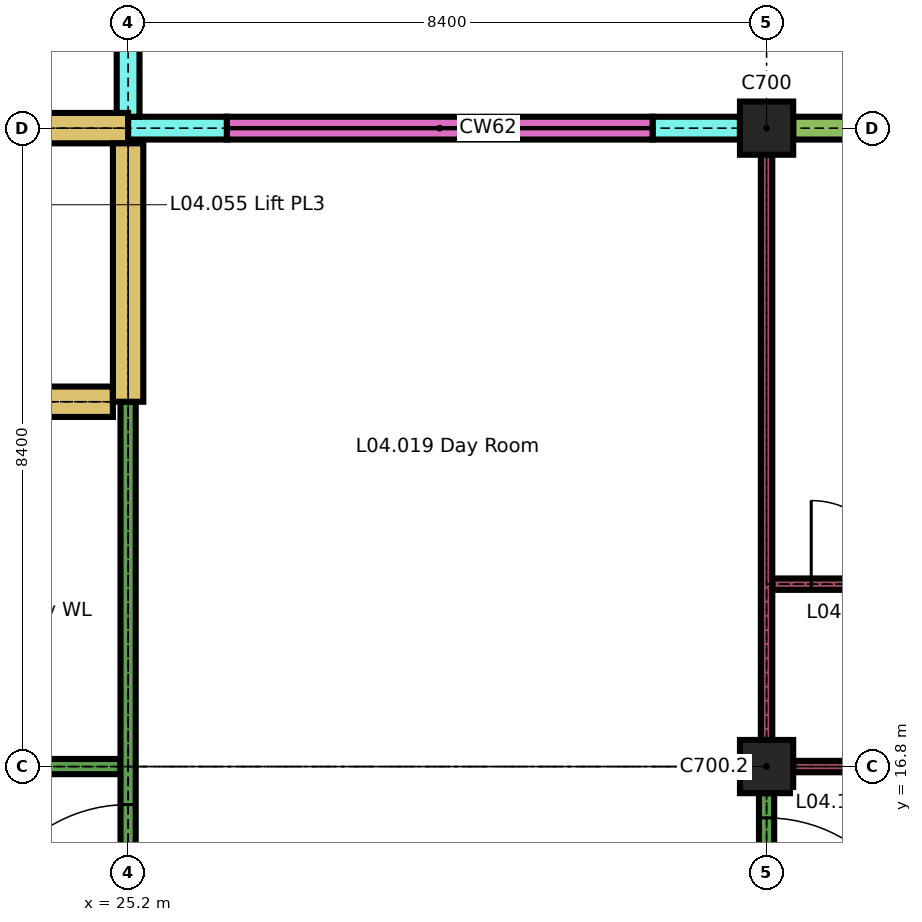
"""IFC4 building model, lengths in metres.
Left out: names, types, materials, properties, quantities, classifications, styles, units other than length and angle.
Written with IfcOpenShell. Run it as: python <this file> out.ifc"""

import sys

from ifc_helpers import new_model, si_unit, direction, frame, frame_2d, origin, origin_2d, place, context, subcontext, project, spatial, rectangle, extrude, element, fill, save


model = new_model("IFC4")
c1 = context("Model", 3, precision=1e-05, world=origin(), true_north=direction((0.0, 1.0)))
c2 = subcontext(c1, "Body", "Model", "MODEL_VIEW")
j1 = project(units=[si_unit("LENGTHUNIT", "METRE"), si_unit("PLANEANGLEUNIT", "RADIAN")], contexts=[c1])
p1 = place(None, origin())
s1 = spatial("IfcSite", under=j1, at=p1, CompositionType="ELEMENT")
p2 = place(p1, origin())
s2 = spatial("IfcBuilding", under=s1, at=p2, CompositionType="ELEMENT")
p3 = place(p2, frame((0.0, 0.0, 18.9)))
s3 = spatial("IfcBuildingStorey", under=s2, at=p3, CompositionType="ELEMENT", Elevation=18.9)
for number, where, z_axis, x_axis in (
    (1, (33.6, 16.8, 0.0), (0.0, 0.0, 1.0), (1.0, 0.0, 0.0)),
    (2, (33.6, 25.2, 0.0), (0.0, 0.0, 1.0), (1.0, 0.0, 0.0)),
):
    element("IfcColumn", number, at=place(p3, frame(where, z_axis=z_axis, x_axis=x_axis)), inside=s3, PredefinedType="COLUMN", context=c2, shape_type="SweptSolid", body=[
        extrude(rectangle(XDim=0.7, YDim=0.7, at=origin_2d()), origin(), (0.0, 0.0, 1.0), 3.26),
    ])
p4 = place(p3, frame((25.05, 25.2, 0.0), z_axis=(0.0, 0.0, 1.0), x_axis=(1.0, 0.0, 0.0)))
e3 = element("IfcWall", 3, at=p4, inside=s3, PredefinedType="SOLIDWALL", context=c2, shape_type="SweptSolid", body=[
    extrude(rectangle(XDim=1.45, YDim=0.3, at=frame_2d((0.725, 0.0))), origin(), (0.0, 0.0, 1.0), 3.26),
])
p5 = place(p3, frame((32.1, 25.2, 0.0), z_axis=(0.0, 0.0, 1.0), x_axis=(1.0, 0.0, 0.0)))
e4 = element("IfcWall", 4, at=p5, inside=s3, PredefinedType="SOLIDWALL", context=c2, shape_type="SweptSolid", body=[
    extrude(rectangle(XDim=1.15, YDim=0.3, at=frame_2d((0.575, 0.0))), origin(), (0.0, 0.0, 1.0), 3.26),
])
p6 = place(p3, frame((26.5, 25.2, 0.0), z_axis=(0.0, 0.0, 1.0), x_axis=(1.0, 0.0, 0.0)))
e5 = element("IfcWall", 5, at=p6, inside=s3, PredefinedType="SOLIDWALL", context=c2, shape_type="SweptSolid", body=[
    extrude(rectangle(XDim=5.6, YDim=0.3, at=frame_2d((2.8, 0.0))), origin(), (0.0, 0.0, 1.0), 0.6),
])
p7 = place(p3, frame((33.95, 25.2, 0.0), z_axis=(0.0, 0.0, 1.0), x_axis=(1.0, 0.0, 0.0)))
e6 = element("IfcWall", 6, at=p7, inside=s3, PredefinedType="SOLIDWALL", context=c2, shape_type="SweptSolid", body=[
    extrude(rectangle(XDim=3.85, YDim=0.3, at=frame_2d((1.925, 0.0))), origin(), (0.0, 0.0, 1.0), 2.96),
])
p8 = place(p7, frame((0.7, 0.0, 0.9)))
e7 = element("IfcOpeningElement", 7, at=p8, cuts=e6, PredefinedType="OPENING", context=c2, shape_type="SweptSolid", body=[
    extrude(rectangle(XDim=2.1, YDim=1.5, at=frame_2d((1.05, 0.75))), frame((0.0, 0.16, 0.0), z_axis=(0.0, -1.0, 0.0), x_axis=(1.0, 0.0, 0.0)), (0.0, 0.0, 1.0), 0.32),
])
p9 = place(p3, frame((25.2, 25.35, 0.0), z_axis=(0.0, 0.0, 1.0), x_axis=(0.0, 1.0, 0.0)))
e8 = element("IfcWall", 8, at=p9, inside=s3, PredefinedType="SOLIDWALL", context=c2, shape_type="SweptSolid", body=[
    extrude(rectangle(XDim=1.15, YDim=0.3, at=frame_2d((0.575, 0.0))), origin(), (0.0, 0.0, 1.0), 3.26),
])
p10 = place(p3, frame((16.7, 16.8, 0.0), z_axis=(0.0, 0.0, 1.0), x_axis=(1.0, 0.0, 0.0)))
e9 = element("IfcWall", 9, at=p10, inside=s3, PredefinedType="PARTITIONING", context=c2, shape_type="SweptSolid", body=[
    extrude(rectangle(XDim=8.4, YDim=0.2, at=frame_2d((4.2, 0.0))), origin(), (0.0, 0.0, 1.0), 3.26),
])
p11 = place(p10, frame((3.25, 0.0, 0.0)))
e10 = element("IfcOpeningElement", 10, at=p11, cuts=e9, PredefinedType="OPENING", context=c2, shape_type="SweptSolid", body=[
    extrude(rectangle(XDim=2.0, YDim=2.4, at=frame_2d((1.0, 1.2))), frame((0.0, 0.11, 0.0), z_axis=(0.0, -1.0, 0.0), x_axis=(1.0, 0.0, 0.0)), (0.0, 0.0, 1.0), 0.22),
])
p12 = place(p3, frame((33.95, 16.8, 0.0), z_axis=(0.0, 0.0, 1.0), x_axis=(1.0, 0.0, 0.0)))
e11 = element("IfcWall", 11, at=p12, inside=s3, PredefinedType="PARTITIONING", context=c2, shape_type="SweptSolid", body=[
    extrude(rectangle(XDim=7.675, YDim=0.15, at=frame_2d((3.837, 0.0))), origin(), (0.0, 0.0, 1.0), 3.26),
])
p13 = place(p12, frame((2.1, 0.0, 0.0)))
e12 = element("IfcOpeningElement", 12, at=p13, cuts=e11, PredefinedType="OPENING", context=c2, shape_type="SweptSolid", body=[
    extrude(rectangle(XDim=1.5, YDim=2.4, at=frame_2d((0.75, 1.2))), frame((0.0, 0.085, 0.0), z_axis=(0.0, -1.0, 0.0), x_axis=(1.0, 0.0, 0.0)), (0.0, 0.0, 1.0), 0.17),
])
p14 = place(p12, frame((5.163, 0.0, 0.0)))
e13 = element("IfcOpeningElement", 13, at=p14, cuts=e11, PredefinedType="OPENING", context=c2, shape_type="SweptSolid", body=[
    extrude(rectangle(XDim=1.2, YDim=2.1, at=frame_2d((0.6, 1.05))), frame((0.0, 0.085, 0.0), z_axis=(0.0, -1.0, 0.0), x_axis=(1.0, 0.0, 0.0)), (0.0, 0.0, 1.0), 0.17),
])
p15 = place(p3, frame((33.675, 19.2, 0.0), z_axis=(0.0, 0.0, 1.0), x_axis=(1.0, 0.0, 0.0)))
e14 = element("IfcWall", 14, at=p15, inside=s3, PredefinedType="PARTITIONING", context=c2, shape_type="SweptSolid", body=[
    extrude(rectangle(XDim=2.2, YDim=0.15, at=frame_2d((1.1, 0.0))), origin(), (0.0, 0.0, 1.0), 3.26),
])
p16 = place(p15, frame((0.512, 0.0, 0.0)))
e15 = element("IfcOpeningElement", 15, at=p16, cuts=e14, PredefinedType="OPENING", context=c2, shape_type="SweptSolid", body=[
    extrude(rectangle(XDim=1.1, YDim=2.1, at=frame_2d((0.55, 1.05))), frame((0.0, 0.085, 0.0), z_axis=(0.0, -1.0, 0.0), x_axis=(1.0, 0.0, 0.0)), (0.0, 0.0, 1.0), 0.17),
])
p17 = place(p3, frame((17.0, 21.6, 0.0), z_axis=(0.0, 0.0, 1.0), x_axis=(1.0, 0.0, 0.0)))
e16 = element("IfcWall", 16, at=p17, inside=s3, PredefinedType="SHEAR", context=c2, shape_type="SweptSolid", body=[
    extrude(rectangle(XDim=8.0, YDim=0.4, at=frame_2d((4.0, 0.0))), origin(), (0.0, 0.0, 1.0), 3.26),
])
p18 = place(p17, frame((1.35, 0.0, 0.0)))
e17 = element("IfcOpeningElement", 17, at=p18, cuts=e16, PredefinedType="OPENING", context=c2, shape_type="SweptSolid", body=[
    extrude(rectangle(XDim=1.3, YDim=2.1, at=frame_2d((0.65, 1.05))), frame((0.0, 0.21, 0.0), z_axis=(0.0, -1.0, 0.0), x_axis=(1.0, 0.0, 0.0)), (0.0, 0.0, 1.0), 0.42),
])
p19 = place(p17, frame((5.45, 0.0, 0.0)))
e18 = element("IfcOpeningElement", 18, at=p19, cuts=e16, PredefinedType="OPENING", context=c2, shape_type="SweptSolid", body=[
    extrude(rectangle(XDim=1.1, YDim=2.1, at=frame_2d((0.55, 1.05))), frame((0.0, 0.21, 0.0), z_axis=(0.0, -1.0, 0.0), x_axis=(1.0, 0.0, 0.0)), (0.0, 0.0, 1.0), 0.42),
])
p20 = place(p3, frame((16.8, 25.2, 0.0), z_axis=(0.0, 0.0, 1.0), x_axis=(1.0, 0.0, 0.0)))
e19 = element("IfcWall", 19, at=p20, inside=s3, PredefinedType="SHEAR", context=c2, shape_type="SweptSolid", body=[
    extrude(rectangle(XDim=8.4, YDim=0.4, at=frame_2d((4.2, 0.0))), origin(), (0.0, 0.0, 1.0), 3.26),
])
p21 = place(p3, frame((25.2, 8.75, 0.0), z_axis=(0.0, 0.0, 1.0), x_axis=(0.0, 1.0, 0.0)))
e20 = element("IfcWall", 20, at=p21, inside=s3, PredefinedType="PARTITIONING", context=c2, shape_type="SweptSolid", body=[
    extrude(rectangle(XDim=12.85, YDim=0.2, at=frame_2d((6.425, 0.0))), origin(), (0.0, 0.0, 1.0), 3.26),
])
p22 = place(p21, frame((0.325, 0.0, 0.0)))
e21 = element("IfcOpeningElement", 21, at=p22, cuts=e20, PredefinedType="OPENING", context=c2, shape_type="SweptSolid", body=[
    extrude(rectangle(XDim=2.0, YDim=2.4, at=frame_2d((1.0, 1.2))), frame((0.0, 0.11, 0.0), z_axis=(0.0, -1.0, 0.0), x_axis=(1.0, 0.0, 0.0)), (0.0, 0.0, 1.0), 0.22),
])
p23 = place(p21, frame((5.55, 0.0, 0.0)))
e22 = element("IfcOpeningElement", 22, at=p23, cuts=e20, PredefinedType="OPENING", context=c2, shape_type="SweptSolid", body=[
    extrude(rectangle(XDim=2.0, YDim=2.4, at=frame_2d((1.0, 1.2))), frame((0.0, 0.11, 0.0), z_axis=(0.0, -1.0, 0.0), x_axis=(1.0, 0.0, 0.0)), (0.0, 0.0, 1.0), 0.22),
])
p24 = place(p3, frame((25.2, 21.6, 0.0), z_axis=(0.0, 0.0, 1.0), x_axis=(0.0, 1.0, 0.0)))
e23 = element("IfcWall", 23, at=p24, inside=s3, PredefinedType="SHEAR", context=c2, shape_type="SweptSolid", body=[
    extrude(rectangle(XDim=3.4, YDim=0.4, at=frame_2d((1.7, 0.0))), origin(), (0.0, 0.0, 1.0), 3.26),
])
p25 = place(p3, frame((33.6, 3.6, 0.0), z_axis=(0.0, 0.0, 1.0), x_axis=(0.0, 1.0, 0.0)))
e24 = element("IfcWall", 24, at=p25, inside=s3, PredefinedType="PARTITIONING", context=c2, shape_type="SweptSolid", body=[
    extrude(rectangle(XDim=12.85, YDim=0.2, at=frame_2d((6.425, 0.0))), origin(), (0.0, 0.0, 1.0), 3.26),
])
p26 = place(p25, frame((5.3, 0.0, 0.0)))
e25 = element("IfcOpeningElement", 25, at=p26, cuts=e24, PredefinedType="OPENING", context=c2, shape_type="SweptSolid", body=[
    extrude(rectangle(XDim=2.0, YDim=2.4, at=frame_2d((1.0, 1.2))), frame((0.0, 0.11, 0.0), z_axis=(0.0, -1.0, 0.0), x_axis=(1.0, 0.0, 0.0)), (0.0, 0.0, 1.0), 0.22),
])
p27 = place(p25, frame((10.525, 0.0, 0.0)))
e26 = element("IfcOpeningElement", 26, at=p27, cuts=e24, PredefinedType="OPENING", context=c2, shape_type="SweptSolid", body=[
    extrude(rectangle(XDim=2.0, YDim=2.4, at=frame_2d((1.0, 1.2))), frame((0.0, 0.11, 0.0), z_axis=(0.0, -1.0, 0.0), x_axis=(1.0, 0.0, 0.0)), (0.0, 0.0, 1.0), 0.22),
])
p28 = place(p3, frame((33.6, 17.15, 0.0), z_axis=(0.0, 0.0, 1.0), x_axis=(0.0, 1.0, 0.0)))
e27 = element("IfcWall", 27, at=p28, inside=s3, PredefinedType="PARTITIONING", context=c2, shape_type="SweptSolid", body=[
    extrude(rectangle(XDim=7.7, YDim=0.15, at=frame_2d((3.85, 0.0))), origin(), (0.0, 0.0, 1.0), 3.26),
])
p29 = place(p16, origin())
e28 = element("IfcDoor", 28, at=p29, inside=s3, OperationType="SINGLE_SWING_RIGHT", PredefinedType="DOOR", context=c2, shape_type="SweptSolid", body=[
    extrude(rectangle(XDim=1.1, YDim=2.1, at=frame_2d((0.55, 1.05))), frame((0.0, 0.025, 0.0), z_axis=(0.0, -1.0, 0.0), x_axis=(1.0, 0.0, 0.0)), (0.0, 0.0, 1.0), 0.05),
])
fill(e15, e28)
p30 = place(p23, origin())
e29 = element("IfcDoor", 29, at=p30, inside=s3, OperationType="SINGLE_SWING_RIGHT", PredefinedType="DOOR", context=c2, shape_type="SweptSolid", body=[
    extrude(rectangle(XDim=2.0, YDim=2.4, at=frame_2d((1.0, 1.2))), frame((0.0, 0.03, 0.0), z_axis=(0.0, -1.0, 0.0), x_axis=(1.0, 0.0, 0.0)), (0.0, 0.0, 1.0), 0.06),
])
fill(e22, e29)
p31 = place(p27, origin())
e30 = element("IfcDoor", 30, at=p31, inside=s3, OperationType="SINGLE_SWING_LEFT", PredefinedType="DOOR", context=c2, shape_type="SweptSolid", body=[
    extrude(rectangle(XDim=2.0, YDim=2.4, at=frame_2d((1.0, 1.2))), frame((0.0, 0.03, 0.0), z_axis=(0.0, -1.0, 0.0), x_axis=(1.0, 0.0, 0.0)), (0.0, 0.0, 1.0), 0.06),
])
fill(e26, e30)
save(model, sys.argv[1])
